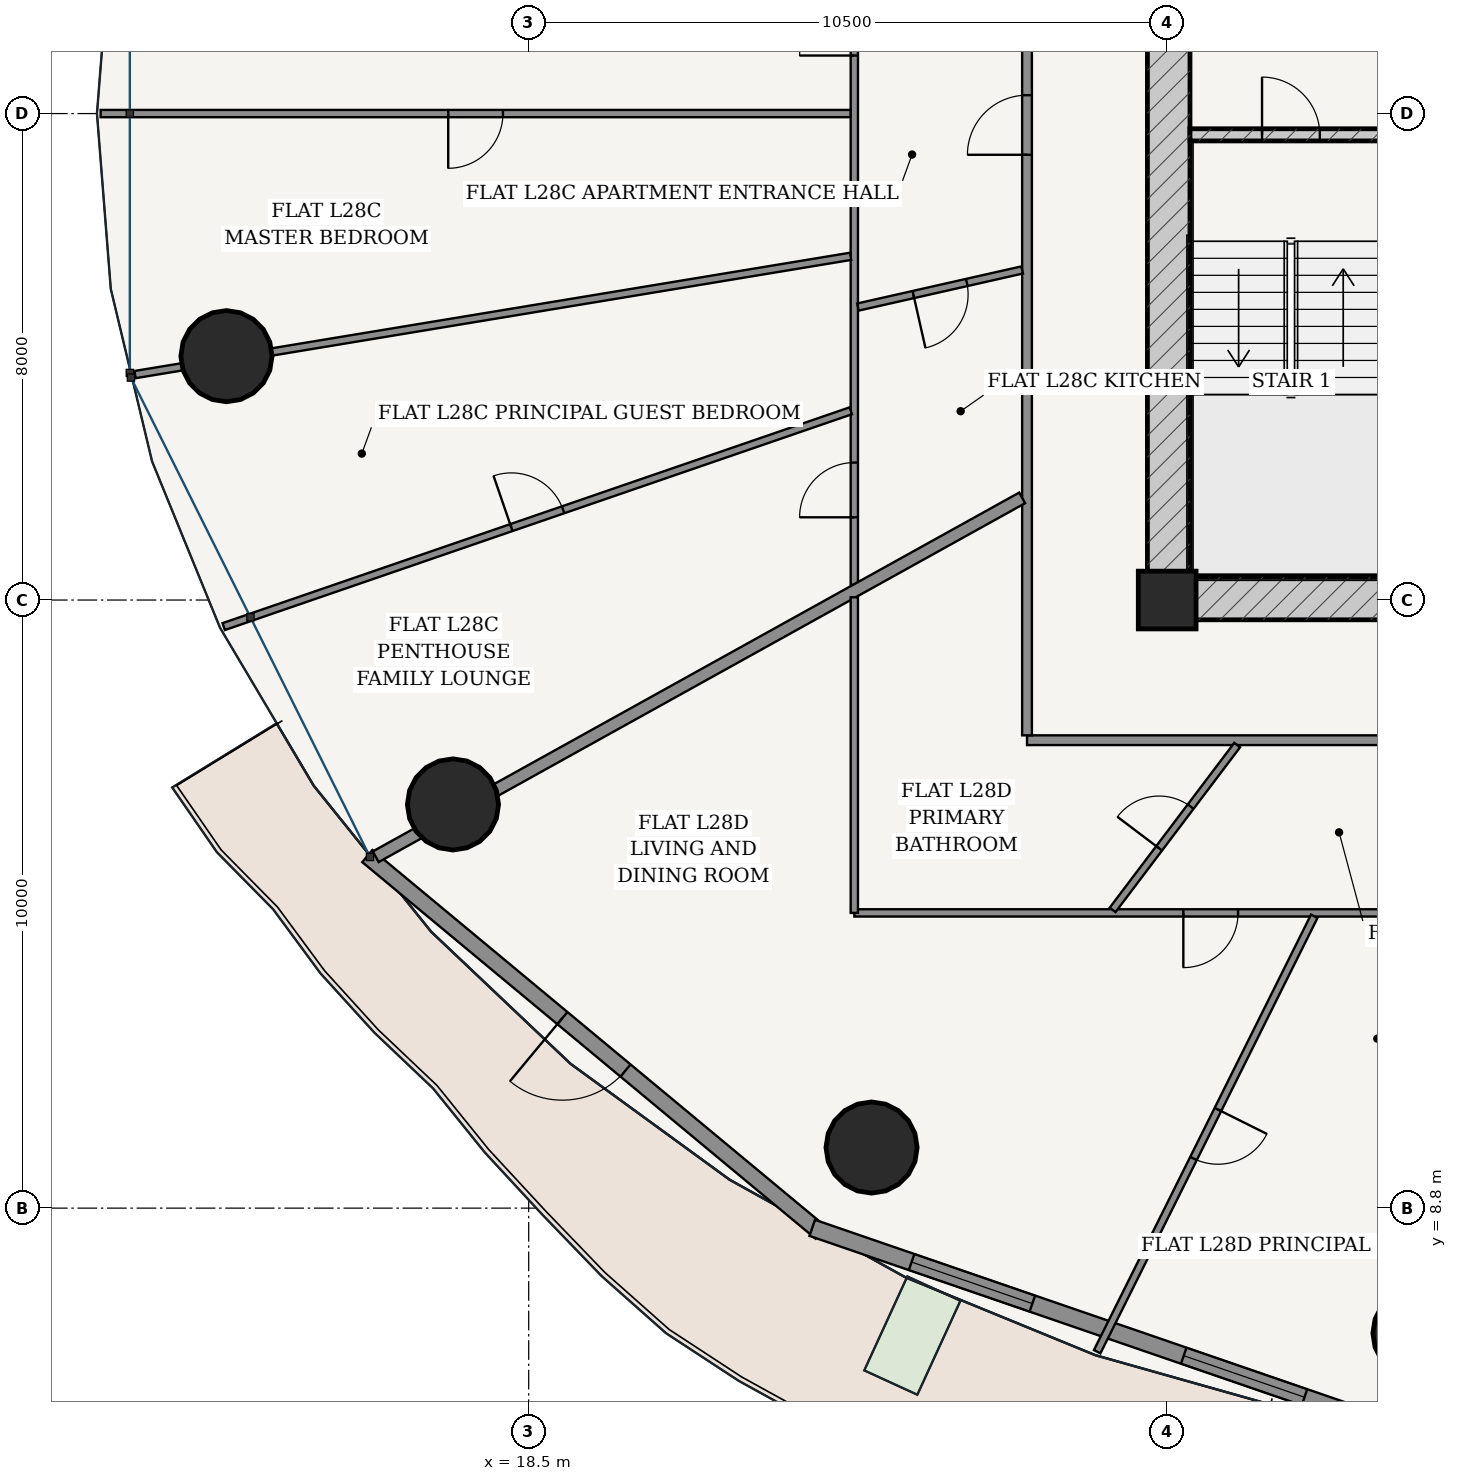
"""IFC4 building model, lengths in metres.
Left out: names, types, materials, properties, quantities, classifications, styles, units other than length and angle.
Written with IfcOpenShell. Run it as: python <this file> out.ifc"""

import sys

from ifc_helpers import new_model, si_unit, direction, frame, frame_2d, origin, origin_2d, place, context, subcontext, project, spatial, rectangle, hollow_circle, extrude, source, transform, mapped, element, fill, save


model = new_model("IFC4")
c1 = context("Model", 3, precision=1e-05, world=origin(), true_north=direction((-0.2419218956, 0.970295726276)))
c2 = subcontext(c1, "Body", "Model", "MODEL_VIEW")
j1 = project(units=[si_unit("LENGTHUNIT", "METRE"), si_unit("PLANEANGLEUNIT", "RADIAN")], contexts=[c1])
p1 = place(None, origin())
s1 = spatial("IfcSite", under=j1, at=p1, CompositionType="ELEMENT")
p2 = place(p1, origin())
s2 = spatial("IfcBuilding", under=s1, at=p2, CompositionType="ELEMENT")
p3 = place(p2, frame((0.0, 0.0, 108.6)))
s3 = spatial("IfcBuildingStorey", under=s2, at=p3, CompositionType="ELEMENT", Elevation=108.6)
p4 = place(p3, frame((29.0, 18.8, 0.0), z_axis=(0.0, 0.0, 1.0), x_axis=(1.0, 0.0, 0.0)))
e1 = element("IfcColumn", 1, at=p4, inside=s3, PredefinedType="COLUMN", context=c2, shape_type="SweptSolid", body=[
    extrude(rectangle(XDim=0.95, YDim=0.95, at=origin_2d()), origin(), (0.0, 0.0, 1.0), 3.6),
])
p5 = place(p3, frame((28.675, 18.825, 0.0), z_axis=(0.0, 0.0, 1.0), x_axis=(1.0, 0.0, 0.0)))
e2 = element("IfcWall", 2, at=p5, inside=s3, PredefinedType="SHEAR", context=c2, shape_type="SweptSolid", body=[
    extrude(rectangle(XDim=18.65, YDim=0.7, at=frame_2d((9.325, 0.0))), origin(), (0.0, 0.0, 1.0), 3.325),
])
p6 = place(p5, frame((6.877, 0.0, 0.0)))
e3 = element("IfcOpeningElement", 3, at=p6, cuts=e2, PredefinedType="OPENING", context=c2, shape_type="SweptSolid", body=[
    extrude(rectangle(XDim=0.85, YDim=2.1, at=frame_2d((0.425, 1.05))), frame((0.0, 0.36, 0.0), z_axis=(0.0, -1.0, 0.0), x_axis=(1.0, 0.0, 0.0)), (0.0, 0.0, 1.0), 0.72),
])
p7 = place(p5, frame((8.9, 0.0, 0.0)))
e4 = element("IfcOpeningElement", 4, at=p7, cuts=e2, PredefinedType="OPENING", context=c2, shape_type="SweptSolid", body=[
    extrude(rectangle(XDim=0.85, YDim=2.1, at=frame_2d((0.425, 1.05))), frame((0.0, 0.36, 0.0), z_axis=(0.0, -1.0, 0.0), x_axis=(1.0, 0.0, 0.0)), (0.0, 0.0, 1.0), 0.72),
])
p8 = place(p5, frame((10.923, 0.0, 0.0)))
e5 = element("IfcOpeningElement", 5, at=p8, cuts=e2, PredefinedType="OPENING", context=c2, shape_type="SweptSolid", body=[
    extrude(rectangle(XDim=0.85, YDim=2.1, at=frame_2d((0.425, 1.05))), frame((0.0, 0.36, 0.0), z_axis=(0.0, -1.0, 0.0), x_axis=(1.0, 0.0, 0.0)), (0.0, 0.0, 1.0), 0.72),
])
p9 = place(p3, frame((29.025, 19.175, 0.0), z_axis=(0.0, 0.0, 1.0), x_axis=(0.0, 1.0, 0.0)))
e6 = element("IfcWall", 6, at=p9, inside=s3, PredefinedType="SHEAR", context=c2, shape_type="SweptSolid", body=[
    extrude(rectangle(XDim=15.25, YDim=0.7, at=frame_2d((7.625, 0.0))), origin(), (0.0, 0.0, 1.0), 3.325),
])
p10 = place(p9, frame((9.875, 0.0, 0.0)))
e7 = element("IfcOpeningElement", 7, at=p10, cuts=e6, PredefinedType="OPENING", context=c2, shape_type="SweptSolid", body=[
    extrude(rectangle(XDim=1.5, YDim=2.2, at=frame_2d((0.75, 1.1))), frame((0.0, 0.36, 0.0), z_axis=(0.0, -1.0, 0.0), x_axis=(1.0, 0.0, 0.0)), (0.0, 0.0, 1.0), 0.72),
])
p11 = place(p3, frame((29.375, 26.45, 0.0), z_axis=(0.0, 0.0, 1.0), x_axis=(1.0, 0.0, 0.0)))
e8 = element("IfcWall", 8, at=p11, inside=s3, PredefinedType="SOLIDWALL", context=c2, shape_type="SweptSolid", body=[
    extrude(rectangle(XDim=3.32, YDim=0.2, at=frame_2d((1.66, 0.0))), origin(), (0.0, 0.0, 1.0), 3.325),
])
p12 = place(p11, frame((1.185, 0.0, 0.0)))
e9 = element("IfcOpeningElement", 9, at=p12, cuts=e8, PredefinedType="OPENING", context=c2, shape_type="SweptSolid", body=[
    extrude(rectangle(XDim=0.95, YDim=2.15, at=frame_2d((0.475, 1.075))), frame((0.0, 0.11, 0.0), z_axis=(0.0, -1.0, 0.0), x_axis=(1.0, 0.0, 0.0)), (0.0, 0.0, 1.0), 0.22),
])
for number, where, z_axis, x_axis in (
    (10, (13.529, 22.81, 0.0), (0.0, 0.0, 1.0), (1.0, 0.0, 0.0)),
    (11, (17.255, 15.438, 0.0), (0.0, 0.0, 1.0), (1.0, 0.0, 0.0)),
    (12, (24.138, 9.796, 0.0), (0.0, 0.0, 1.0), (1.0, 0.0, 0.0)),
    (13, (33.133, 6.743, 0.0), (0.0, 0.0, 1.0), (1.0, 0.0, 0.0)),
):
    element("IfcColumn", number, at=place(p3, frame(where, z_axis=z_axis, x_axis=x_axis)), inside=s3, PredefinedType="COLUMN", context=c2, shape_type="SweptSolid", body=[
        extrude(hollow_circle(Radius=0.75, WallThickness=0.045, at=origin_2d()), origin(), (0.0, 0.0, 1.0), 3.6),
    ])
p13 = place(p3, frame((15.846, 14.59, 0.0), z_axis=(0.0, 0.0, 1.0), x_axis=(0.769254958887, -0.638941944333, 0.0)))
e14 = element("IfcWall", 14, at=p13, inside=s3, PredefinedType="SOLIDWALL", context=c2, shape_type="SweptSolid", body=[
    extrude(rectangle(XDim=9.69, YDim=0.26, at=frame_2d((4.845, 0.0))), origin(), (0.0, 0.0, 1.0), 3.325),
])
p14 = place(p13, frame((4.17, 0.0, 0.0)))
e15 = element("IfcOpeningElement", 15, at=p14, cuts=e14, PredefinedType="OPENING", context=c2, shape_type="SweptSolid", body=[
    extrude(rectangle(XDim=1.35, YDim=2.2, at=frame_2d((0.675, 1.1))), frame((0.0, 0.14, 0.0), z_axis=(0.0, -1.0, 0.0), x_axis=(1.0, 0.0, 0.0)), (0.0, 0.0, 1.0), 0.28),
])
p15 = place(p3, frame((23.163, 8.476, 0.0), z_axis=(0.0, 0.0, 1.0), x_axis=(0.945590132341, -0.325360264351, 0.0)))
e16 = element("IfcWall", 16, at=p15, inside=s3, PredefinedType="SOLIDWALL", context=c2, shape_type="SweptSolid", body=[
    extrude(rectangle(XDim=10.289, YDim=0.28, at=frame_2d((5.145, 0.0))), origin(), (0.0, 0.0, 1.0), 3.325),
])
p16 = place(p15, frame((1.728, 0.0, 0.85)))
e17 = element("IfcOpeningElement", 17, at=p16, cuts=e16, PredefinedType="OPENING", context=c2, shape_type="SweptSolid", body=[
    extrude(rectangle(XDim=2.1, YDim=1.95, at=frame_2d((1.05, 0.975))), frame((0.0, 0.15, 0.0), z_axis=(0.0, -1.0, 0.0), x_axis=(1.0, 0.0, 0.0)), (0.0, 0.0, 1.0), 0.3),
])
p17 = place(p15, frame((6.461, 0.0, 0.85)))
e18 = element("IfcOpeningElement", 18, at=p17, cuts=e16, PredefinedType="OPENING", context=c2, shape_type="SweptSolid", body=[
    extrude(rectangle(XDim=2.1, YDim=1.95, at=frame_2d((1.05, 0.975))), frame((0.0, 0.15, 0.0), z_axis=(0.0, -1.0, 0.0), x_axis=(1.0, 0.0, 0.0)), (0.0, 0.0, 1.0), 0.3),
])
p18 = place(p3, frame((26.695, 16.495, 0.0), z_axis=(0.0, 0.0, 1.0), x_axis=(1.0, 0.0, 0.0)))
e19 = element("IfcWall", 19, at=p18, inside=s3, PredefinedType="PARTITIONING", context=c2, shape_type="SweptSolid", body=[
    extrude(rectangle(XDim=22.61, YDim=0.16, at=frame_2d((11.305, 0.0))), origin(), (0.0, 0.0, 1.0), 2.767),
])
p19 = place(p18, frame((6.974, 0.0, 0.0)))
e20 = element("IfcOpeningElement", 20, at=p19, cuts=e19, PredefinedType="OPENING", context=c2, shape_type="SweptSolid", body=[
    extrude(rectangle(XDim=0.98, YDim=2.2, at=frame_2d((0.49, 1.1))), frame((0.0, 0.09, 0.0), z_axis=(0.0, -1.0, 0.0), x_axis=(1.0, 0.0, 0.0)), (0.0, 0.0, 1.0), 0.18),
])
p20 = place(p18, frame((18.922, 0.0, 0.0)))
e21 = element("IfcOpeningElement", 21, at=p20, cuts=e19, PredefinedType="OPENING", context=c2, shape_type="SweptSolid", body=[
    extrude(rectangle(XDim=0.98, YDim=2.2, at=frame_2d((0.49, 1.1))), frame((0.0, 0.09, 0.0), z_axis=(0.0, -1.0, 0.0), x_axis=(1.0, 0.0, 0.0)), (0.0, 0.0, 1.0), 0.18),
])
p21 = place(p3, frame((26.695, 16.575, 0.0), z_axis=(0.0, 0.0, 1.0), x_axis=(0.0, 1.0, 0.0)))
e22 = element("IfcWall", 22, at=p21, inside=s3, PredefinedType="PARTITIONING", context=c2, shape_type="SweptSolid", body=[
    extrude(rectangle(XDim=20.45, YDim=0.16, at=frame_2d((10.225, 0.0))), origin(), (0.0, 0.0, 1.0), 2.767),
])
p22 = place(p21, frame((9.547, 0.0, 0.0)))
e23 = element("IfcOpeningElement", 23, at=p22, cuts=e22, PredefinedType="OPENING", context=c2, shape_type="SweptSolid", body=[
    extrude(rectangle(XDim=0.98, YDim=2.2, at=frame_2d((0.49, 1.1))), frame((0.0, 0.09, 0.0), z_axis=(0.0, -1.0, 0.0), x_axis=(1.0, 0.0, 0.0)), (0.0, 0.0, 1.0), 0.18),
])
p23 = place(p3, frame((23.855, 19.05, 0.0), z_axis=(0.0, 0.0, 1.0), x_axis=(0.0, 1.0, 0.0)))
e24 = element("IfcWall", 24, at=p23, inside=s3, PredefinedType="PARTITIONING", context=c2, shape_type="SweptSolid", body=[
    extrude(rectangle(XDim=15.501, YDim=0.12, at=frame_2d((7.75, 0.0))), origin(), (0.0, 0.0, 1.0), 2.767),
])
p24 = place(p23, frame((8.705, 0.0, 0.0)))
e25 = element("IfcOpeningElement", 25, at=p24, cuts=e24, PredefinedType="OPENING", context=c2, shape_type="SweptSolid", body=[
    extrude(rectangle(XDim=0.9, YDim=2.15, at=frame_2d((0.45, 1.075))), frame((0.0, 0.07, 0.0), z_axis=(0.0, -1.0, 0.0), x_axis=(1.0, 0.0, 0.0)), (0.0, 0.0, 1.0), 0.14),
])
p25 = place(p23, frame((1.111, 0.0, 0.0)))
e26 = element("IfcOpeningElement", 26, at=p25, cuts=e24, PredefinedType="OPENING", context=c2, shape_type="SweptSolid", body=[
    extrude(rectangle(XDim=0.9, YDim=2.15, at=frame_2d((0.45, 1.075))), frame((0.0, 0.07, 0.0), z_axis=(0.0, -1.0, 0.0), x_axis=(1.0, 0.0, 0.0)), (0.0, 0.0, 1.0), 0.14),
])
p26 = place(p3, frame((23.793, 26.8, 0.0), z_axis=(0.0, 0.0, 1.0), x_axis=(-1.0, 0.0, 0.0)))
e27 = element("IfcWall", 27, at=p26, inside=s3, PredefinedType="PARTITIONING", context=c2, shape_type="SweptSolid", body=[
    extrude(rectangle(XDim=12.333, YDim=0.12, at=frame_2d((6.167, 0.0))), origin(), (0.0, 0.0, 1.0), 2.767),
])
p27 = place(p26, frame((5.717, 0.0, 0.0)))
e28 = element("IfcOpeningElement", 28, at=p27, cuts=e27, PredefinedType="OPENING", context=c2, shape_type="SweptSolid", body=[
    extrude(rectangle(XDim=0.9, YDim=2.15, at=frame_2d((0.45, 1.075))), frame((0.0, 0.07, 0.0), z_axis=(0.0, -1.0, 0.0), x_axis=(1.0, 0.0, 0.0)), (0.0, 0.0, 1.0), 0.14),
])
p28 = place(p3, frame((23.794, 24.452, 0.0), z_axis=(0.0, 0.0, 1.0), x_axis=(-0.986620350945, -0.163034607068, 0.0)))
e29 = element("IfcWall", 29, at=p28, inside=s3, PredefinedType="PARTITIONING", context=c2, shape_type="SweptSolid", body=[
    extrude(rectangle(XDim=11.927, YDim=0.12, at=frame_2d((5.964, 0.0))), origin(), (0.0, 0.0, 1.0), 2.767),
])
p29 = place(p3, frame((23.796, 21.912, 0.0), z_axis=(0.0, 0.0, 1.0), x_axis=(-0.945574063861, -0.325406960209, 0.0)))
e30 = element("IfcWall", 30, at=p29, inside=s3, PredefinedType="PARTITIONING", context=c2, shape_type="SweptSolid", body=[
    extrude(rectangle(XDim=10.906, YDim=0.12, at=frame_2d((5.453, 0.0))), origin(), (0.0, 0.0, 1.0), 2.767),
])
p30 = place(p29, frame((5.003, 0.0, 0.0)))
e31 = element("IfcOpeningElement", 31, at=p30, cuts=e30, PredefinedType="OPENING", context=c2, shape_type="SweptSolid", body=[
    extrude(rectangle(XDim=0.9, YDim=2.15, at=frame_2d((0.45, 1.075))), frame((0.0, 0.07, 0.0), z_axis=(0.0, -1.0, 0.0), x_axis=(1.0, 0.0, 0.0)), (0.0, 0.0, 1.0), 0.14),
])
p31 = place(p3, frame((26.615, 24.228, 0.0), z_axis=(0.0, 0.0, 1.0), x_axis=(-0.975417151515, -0.220366468706, 0.0)))
e32 = element("IfcWall", 32, at=p31, inside=s3, PredefinedType="PARTITIONING", context=c2, shape_type="SweptSolid", body=[
    extrude(rectangle(XDim=2.768, YDim=0.12, at=frame_2d((1.384, 0.0))), origin(), (0.0, 0.0, 1.0), 3.325),
])
p32 = place(p31, frame((0.934, 0.0, 0.0)))
e33 = element("IfcOpeningElement", 33, at=p32, cuts=e32, PredefinedType="OPENING", context=c2, shape_type="SweptSolid", body=[
    extrude(rectangle(XDim=0.9, YDim=2.15, at=frame_2d((0.45, 1.075))), frame((0.0, 0.07, 0.0), z_axis=(0.0, -1.0, 0.0), x_axis=(1.0, 0.0, 0.0)), (0.0, 0.0, 1.0), 0.14),
])
p33 = place(p3, frame((26.615, 20.48, 0.0), z_axis=(0.0, 0.0, 1.0), x_axis=(-0.874310671773, -0.48536671623, 0.0)))
e34 = element("IfcWall", 34, at=p33, inside=s3, PredefinedType="PARTITIONING", context=c2, shape_type="SweptSolid", body=[
    extrude(rectangle(XDim=12.159, YDim=0.2, at=frame_2d((6.079, 0.0))), origin(), (0.0, 0.0, 1.0), 2.767),
])
p34 = place(p3, frame((44.451, 13.655, 0.0), z_axis=(0.0, 0.0, 1.0), x_axis=(-1.0, 0.0, 0.0)))
e35 = element("IfcWall", 35, at=p34, inside=s3, PredefinedType="PARTITIONING", context=c2, shape_type="SweptSolid", body=[
    extrude(rectangle(XDim=20.596, YDim=0.12, at=frame_2d((10.298, 0.0))), origin(), (0.0, 0.0, 1.0), 2.767),
])
p35 = place(p34, frame((14.286, 0.0, 0.0)))
e36 = element("IfcOpeningElement", 36, at=p35, cuts=e35, PredefinedType="OPENING", context=c2, shape_type="SweptSolid", body=[
    extrude(rectangle(XDim=0.9, YDim=2.15, at=frame_2d((0.45, 1.075))), frame((0.0, 0.07, 0.0), z_axis=(0.0, -1.0, 0.0), x_axis=(1.0, 0.0, 0.0)), (0.0, 0.0, 1.0), 0.14),
])
p36 = place(p34, frame((2.815, 0.0, 0.0)))
e37 = element("IfcOpeningElement", 37, at=p36, cuts=e35, PredefinedType="OPENING", context=c2, shape_type="SweptSolid", body=[
    extrude(rectangle(XDim=0.9, YDim=2.15, at=frame_2d((0.45, 1.075))), frame((0.0, 0.07, 0.0), z_axis=(0.0, -1.0, 0.0), x_axis=(1.0, 0.0, 0.0)), (0.0, 0.0, 1.0), 0.14),
])
p37 = place(p3, frame((23.855, 13.655, 0.0), z_axis=(0.0, 0.0, 1.0), x_axis=(0.0, 1.0, 0.0)))
e38 = element("IfcWall", 38, at=p37, inside=s3, PredefinedType="PARTITIONING", context=c2, shape_type="SweptSolid", body=[
    extrude(rectangle(XDim=5.19, YDim=0.12, at=frame_2d((2.595, 0.0))), origin(), (0.0, 0.0, 1.0), 3.004),
])
p38 = place(p3, frame((31.419, 13.6, 0.0), z_axis=(0.0, 0.0, 1.0), x_axis=(-0.446188142997, -0.894939182877, 0.0)))
e39 = element("IfcWall", 39, at=p38, inside=s3, PredefinedType="PARTITIONING", context=c2, shape_type="SweptSolid", body=[
    extrude(rectangle(XDim=8.002, YDim=0.12, at=frame_2d((4.001, 0.0))), origin(), (0.0, 0.0, 1.0), 2.767),
])
p39 = place(p38, frame((3.551, 0.0, 0.0)))
e40 = element("IfcOpeningElement", 40, at=p39, cuts=e39, PredefinedType="OPENING", context=c2, shape_type="SweptSolid", body=[
    extrude(rectangle(XDim=0.9, YDim=2.15, at=frame_2d((0.45, 1.075))), frame((0.0, 0.07, 0.0), z_axis=(0.0, -1.0, 0.0), x_axis=(1.0, 0.0, 0.0)), (0.0, 0.0, 1.0), 0.14),
])
p40 = place(p3, frame((30.151, 16.415, 0.0), z_axis=(0.0, 0.0, 1.0), x_axis=(-0.602927617913, -0.79779589342, 0.0)))
e41 = element("IfcWall", 41, at=p40, inside=s3, PredefinedType="PARTITIONING", context=c2, shape_type="SweptSolid", body=[
    extrude(rectangle(XDim=3.398, YDim=0.12, at=frame_2d((1.699, 0.0))), origin(), (0.0, 0.0, 1.0), 3.004),
])
p41 = place(p40, frame((1.269, 0.0, 0.0)))
e42 = element("IfcOpeningElement", 42, at=p41, cuts=e41, PredefinedType="OPENING", context=c2, shape_type="SweptSolid", body=[
    extrude(rectangle(XDim=0.86, YDim=2.15, at=frame_2d((0.43, 1.075))), frame((0.0, 0.07, 0.0), z_axis=(0.0, -1.0, 0.0), x_axis=(1.0, 0.0, 0.0)), (0.0, 0.0, 1.0), 0.14),
])
m1 = source(origin(), c2, "Body", "SweptSolid", [
    extrude(rectangle(XDim=1.35, YDim=2.2, at=frame_2d((0.675, 1.1))), frame((0.0, 0.025, 0.0), z_axis=(0.0, -1.0, 0.0), x_axis=(1.0, 0.0, 0.0)), (0.0, 0.0, 1.0), 0.05),
])
p42 = place(p14, frame((1.35, 0.0, 0.0), z_axis=(0.0, 0.0, 1.0), x_axis=(-1.0, 0.0, 0.0)))
e43 = element("IfcDoor", 43, at=p42, inside=s3, OperationType="SINGLE_SWING_RIGHT", PredefinedType="DOOR", context=c2, shape_type="MappedRepresentation", body=[
    mapped(m1, transform((0.0, 0.0, 0.0), scale=1.0)),
])
fill(e15, e43)
m2 = source(origin(), c2, "Body", "SweptSolid", [
    extrude(rectangle(XDim=2.1, YDim=1.95, at=frame_2d((1.05, 0.975))), frame((0.0, 0.03, 0.0), z_axis=(0.0, -1.0, 0.0), x_axis=(1.0, 0.0, 0.0)), (0.0, 0.0, 1.0), 0.06),
])
p43 = place(p16, origin())
e44 = element("IfcWindow", 44, at=p43, inside=s3, PartitioningType="SINGLE_PANEL", PredefinedType="WINDOW", context=c2, shape_type="MappedRepresentation", body=[
    mapped(m2, transform((0.0, 0.0, 0.0), scale=1.0)),
])
fill(e17, e44)
p44 = place(p17, origin())
e45 = element("IfcWindow", 45, at=p44, inside=s3, PartitioningType="SINGLE_PANEL", PredefinedType="WINDOW", context=c2, shape_type="MappedRepresentation", body=[
    mapped(m2, transform((0.0, 0.0, 0.0), scale=1.0)),
])
fill(e18, e45)
m3 = source(origin(), c2, "Body", "SweptSolid", [
    extrude(rectangle(XDim=0.95, YDim=2.15, at=frame_2d((0.475, 1.075))), frame((0.0, 0.025, 0.0), z_axis=(0.0, -1.0, 0.0), x_axis=(1.0, 0.0, 0.0)), (0.0, 0.0, 1.0), 0.05),
])
p45 = place(p12, origin())
e46 = element("IfcDoor", 46, at=p45, inside=s3, OperationType="SINGLE_SWING_LEFT", PredefinedType="DOOR", context=c2, shape_type="MappedRepresentation", body=[
    mapped(m3, transform((0.0, 0.0, 0.0), scale=1.0)),
])
fill(e9, e46)
m4 = source(origin(), c2, "Body", "SweptSolid", [
    extrude(rectangle(XDim=0.98, YDim=2.2, at=frame_2d((0.49, 1.1))), frame((0.0, 0.025, 0.0), z_axis=(0.0, -1.0, 0.0), x_axis=(1.0, 0.0, 0.0)), (0.0, 0.0, 1.0), 0.05),
])
p46 = place(p22, origin())
e47 = element("IfcDoor", 47, at=p46, inside=s3, OperationType="SINGLE_SWING_LEFT", PredefinedType="DOOR", context=c2, shape_type="MappedRepresentation", body=[
    mapped(m4, transform((0.0, 0.0, 0.0), scale=1.0)),
])
fill(e23, e47)
m5 = source(origin(), c2, "Body", "SweptSolid", [
    extrude(rectangle(XDim=0.9, YDim=2.15, at=frame_2d((0.45, 1.075))), frame((0.0, 0.025, 0.0), z_axis=(0.0, -1.0, 0.0), x_axis=(1.0, 0.0, 0.0)), (0.0, 0.0, 1.0), 0.05),
])
p47 = place(p24, origin())
e48 = element("IfcDoor", 48, at=p47, inside=s3, OperationType="SINGLE_SWING_LEFT", PredefinedType="DOOR", context=c2, shape_type="MappedRepresentation", body=[
    mapped(m5, transform((0.0, 0.0, 0.0), scale=1.0)),
])
fill(e25, e48)
p48 = place(p32, origin())
e49 = element("IfcDoor", 49, at=p48, inside=s3, OperationType="SINGLE_SWING_RIGHT", PredefinedType="DOOR", context=c2, shape_type="MappedRepresentation", body=[
    mapped(m5, transform((0.0, 0.0, 0.0), scale=1.0)),
])
fill(e33, e49)
p49 = place(p25, origin())
e50 = element("IfcDoor", 50, at=p49, inside=s3, OperationType="SINGLE_SWING_LEFT", PredefinedType="DOOR", context=c2, shape_type="MappedRepresentation", body=[
    mapped(m5, transform((0.0, 0.0, 0.0), scale=1.0)),
])
fill(e26, e50)
p50 = place(p27, origin())
e51 = element("IfcDoor", 51, at=p50, inside=s3, OperationType="SINGLE_SWING_RIGHT", PredefinedType="DOOR", context=c2, shape_type="MappedRepresentation", body=[
    mapped(m5, transform((0.0, 0.0, 0.0), scale=1.0)),
])
fill(e28, e51)
p51 = place(p30, frame((0.9, 0.0, 0.0), z_axis=(0.0, 0.0, 1.0), x_axis=(-1.0, 0.0, 0.0)))
e52 = element("IfcDoor", 52, at=p51, inside=s3, OperationType="SINGLE_SWING_LEFT", PredefinedType="DOOR", context=c2, shape_type="MappedRepresentation", body=[
    mapped(m5, transform((0.0, 0.0, 0.0), scale=1.0)),
])
fill(e31, e52)
m6 = source(origin(), c2, "Body", "SweptSolid", [
    extrude(rectangle(XDim=0.86, YDim=2.15, at=frame_2d((0.43, 1.075))), frame((0.0, 0.025, 0.0), z_axis=(0.0, -1.0, 0.0), x_axis=(1.0, 0.0, 0.0)), (0.0, 0.0, 1.0), 0.05),
])
p52 = place(p41, frame((0.86, 0.0, 0.0), z_axis=(0.0, 0.0, 1.0), x_axis=(-1.0, 0.0, 0.0)))
e53 = element("IfcDoor", 53, at=p52, inside=s3, OperationType="SINGLE_SWING_LEFT", PredefinedType="DOOR", context=c2, shape_type="MappedRepresentation", body=[
    mapped(m6, transform((0.0, 0.0, 0.0), scale=1.0)),
])
fill(e42, e53)
p53 = place(p35, origin())
e54 = element("IfcDoor", 54, at=p53, inside=s3, OperationType="SINGLE_SWING_RIGHT", PredefinedType="DOOR", context=c2, shape_type="MappedRepresentation", body=[
    mapped(m5, transform((0.0, 0.0, 0.0), scale=1.0)),
])
fill(e36, e54)
p54 = place(p39, origin())
e55 = element("IfcDoor", 55, at=p54, inside=s3, OperationType="SINGLE_SWING_LEFT", PredefinedType="DOOR", context=c2, shape_type="MappedRepresentation", body=[
    mapped(m5, transform((0.0, 0.0, 0.0), scale=1.0)),
])
fill(e40, e55)
save(model, sys.argv[1])
